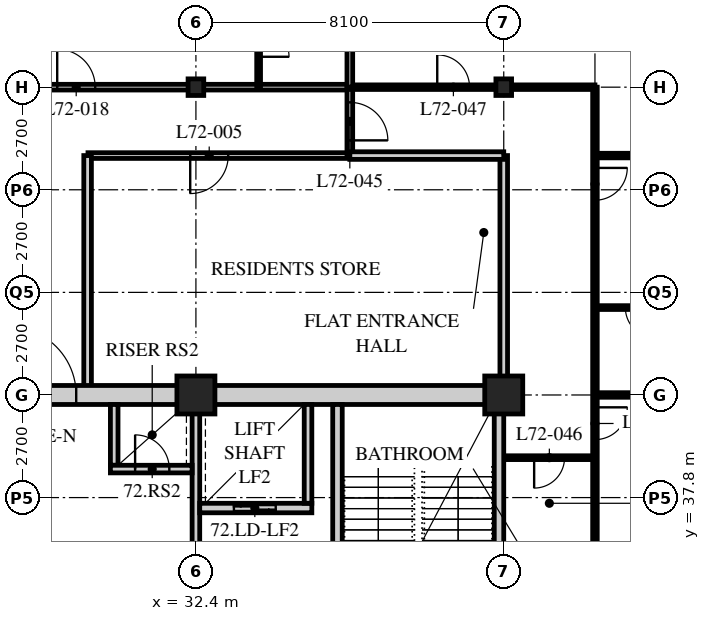
"""IFC4 building model, lengths in metres.
Left out: names, types, materials, properties, quantities, classifications, styles, units other than length and angle.
Written with IfcOpenShell. Run it as: python <this file> out.ifc"""

import sys

from ifc_helpers import new_model, si_unit, direction, frame, frame_2d, origin, origin_2d, place, context, subcontext, project, spatial, rectangle, hollow_rectangle, i_section, extrude, element, fill, save


model = new_model("IFC4")
c1 = context("Model", 3, precision=1e-05, world=origin(), true_north=direction((0.0, 1.0)))
c2 = subcontext(c1, "Body", "Model", "MODEL_VIEW")
j1 = project(units=[si_unit("LENGTHUNIT", "METRE"), si_unit("PLANEANGLEUNIT", "RADIAN")], contexts=[c1])
p1 = place(None, origin())
s1 = spatial("IfcSite", under=j1, at=p1, CompositionType="ELEMENT")
p2 = place(p1, origin())
s2 = spatial("IfcBuilding", under=s1, at=p2, CompositionType="ELEMENT")
p3 = place(p2, frame((0.0, 0.0, 281.4)))
s3 = spatial("IfcBuildingStorey", under=s2, at=p3, CompositionType="ELEMENT", Elevation=281.4)
p4 = place(p3, frame((32.4, 40.5, 0.0), z_axis=(0.0, 0.0, 1.0), x_axis=(1.0, 0.0, 0.0)))
e1 = element("IfcColumn", 1, at=p4, inside=s3, PredefinedType="COLUMN", context=c2, shape_type="SweptSolid", body=[
    extrude(hollow_rectangle(XDim=1.0, YDim=1.0, WallThickness=0.1, at=origin_2d()), origin(), (0.0, 0.0, 1.0), 3.9),
])
p5 = place(p3, frame((32.4, 48.6, 0.0), z_axis=(0.0, 0.0, 1.0), x_axis=(1.0, 0.0, 0.0)))
e2 = element("IfcColumn", 2, at=p5, inside=s3, PredefinedType="COLUMN", context=c2, shape_type="SweptSolid", body=[
    extrude(i_section(OverallWidth=0.412, OverallDepth=0.437, WebThickness=0.036, FlangeThickness=0.058, FilletRadius=0.015, at=origin_2d()), origin(), (0.0, 0.0, 1.0), 3.9),
])
p6 = place(p3, frame((40.5, 40.5, 0.0), z_axis=(0.0, 0.0, 1.0), x_axis=(1.0, 0.0, 0.0)))
e3 = element("IfcColumn", 3, at=p6, inside=s3, PredefinedType="COLUMN", context=c2, shape_type="SweptSolid", body=[
    extrude(hollow_rectangle(XDim=1.0, YDim=1.0, WallThickness=0.1, at=origin_2d()), origin(), (0.0, 0.0, 1.0), 3.9),
])
p7 = place(p3, frame((40.5, 48.6, 0.0), z_axis=(0.0, 0.0, 1.0), x_axis=(1.0, 0.0, 0.0)))
e4 = element("IfcColumn", 4, at=p7, inside=s3, PredefinedType="COLUMN", context=c2, shape_type="SweptSolid", body=[
    extrude(i_section(OverallWidth=0.412, OverallDepth=0.437, WebThickness=0.036, FlangeThickness=0.058, FilletRadius=0.015, at=origin_2d()), origin(), (0.0, 0.0, 1.0), 3.9),
])
p8 = place(p3, frame((12.15, 48.6, 0.0), z_axis=(0.0, 0.0, 1.0), x_axis=(1.0, 0.0, 0.0)))
e5 = element("IfcWall", 5, at=p8, inside=s3, PredefinedType="PARTITIONING", context=c2, shape_type="SweptSolid", body=[
    extrude(rectangle(XDim=24.3, YDim=0.15, at=frame_2d((12.15, 0.0))), origin(), (0.0, 0.0, 1.0), 3.078),
])
p9 = place(p8, frame((4.95, 0.0, 0.0)))
e6 = element("IfcOpeningElement", 6, at=p9, cuts=e5, PredefinedType="OPENING", context=c2, shape_type="SweptSolid", body=[
    extrude(rectangle(XDim=1.0, YDim=2.1, at=frame_2d((0.5, 1.05))), frame((0.0, 0.085, 0.0), z_axis=(0.0, -1.0, 0.0), x_axis=(1.0, 0.0, 0.0)), (0.0, 0.0, 1.0), 0.17),
])
p10 = place(p8, frame((16.6, 0.0, 0.0)))
e7 = element("IfcOpeningElement", 7, at=p10, cuts=e5, PredefinedType="OPENING", context=c2, shape_type="SweptSolid", body=[
    extrude(rectangle(XDim=1.0, YDim=2.1, at=frame_2d((0.5, 1.05))), frame((0.0, 0.085, 0.0), z_axis=(0.0, -1.0, 0.0), x_axis=(1.0, 0.0, 0.0)), (0.0, 0.0, 1.0), 0.17),
])
p11 = place(p8, frame((1.525, 0.0, 0.0)))
e8 = element("IfcOpeningElement", 8, at=p11, cuts=e5, PredefinedType="OPENING", context=c2, shape_type="SweptSolid", body=[
    extrude(rectangle(XDim=1.0, YDim=2.1, at=frame_2d((0.5, 1.05))), frame((0.0, 0.085, 0.0), z_axis=(0.0, -1.0, 0.0), x_axis=(1.0, 0.0, 0.0)), (0.0, 0.0, 1.0), 0.17),
])
p12 = place(p3, frame((29.56, 46.8, 0.0), z_axis=(0.0, 0.0, 1.0), x_axis=(1.0, 0.0, 0.0)))
e9 = element("IfcWall", 9, at=p12, inside=s3, PredefinedType="PARTITIONING", context=c2, shape_type="SweptSolid", body=[
    extrude(rectangle(XDim=6.89, YDim=0.15, at=frame_2d((3.445, 0.0))), origin(), (0.0, 0.0, 1.0), 3.69),
])
p13 = place(p12, frame((2.69, 0.0, 0.0)))
e10 = element("IfcOpeningElement", 10, at=p13, cuts=e9, PredefinedType="OPENING", context=c2, shape_type="SweptSolid", body=[
    extrude(rectangle(XDim=1.0, YDim=2.1, at=frame_2d((0.5, 1.05))), frame((0.0, 0.085, 0.0), z_axis=(0.0, -1.0, 0.0), x_axis=(1.0, 0.0, 0.0)), (0.0, 0.0, 1.0), 0.17),
])
p14 = place(p3, frame((29.55, 40.5, 0.0), z_axis=(0.0, 0.0, 1.0), x_axis=(0.0, 1.0, 0.0)))
e11 = element("IfcWall", 11, at=p14, inside=s3, PredefinedType="SOLIDWALL", context=c2, shape_type="SweptSolid", body=[
    extrude(rectangle(XDim=6.3, YDim=0.2, at=frame_2d((3.15, 0.0))), origin(), (0.0, 0.0, 1.0), 3.69),
])
p15 = place(p3, frame((36.45, 46.8, 0.0), z_axis=(0.0, 0.0, 1.0), x_axis=(0.0, 1.0, 0.0)))
e12 = element("IfcWall", 12, at=p15, inside=s3, PredefinedType="PARTITIONING", context=c2, shape_type="SweptSolid", body=[
    extrude(rectangle(XDim=1.8, YDim=0.15, at=frame_2d((0.9, 0.0))), origin(), (0.0, 0.0, 1.0), 3.69),
])
p16 = place(p15, frame((0.4, 0.0, 0.0)))
e13 = element("IfcOpeningElement", 13, at=p16, cuts=e12, PredefinedType="OPENING", context=c2, shape_type="SweptSolid", body=[
    extrude(rectangle(XDim=1.0, YDim=2.1, at=frame_2d((0.5, 1.05))), frame((0.0, 0.085, 0.0), z_axis=(0.0, -1.0, 0.0), x_axis=(1.0, 0.0, 0.0)), (0.0, 0.0, 1.0), 0.17),
])
p17 = place(p3, frame((40.5, 40.5, 0.0), z_axis=(0.0, 0.0, 1.0), x_axis=(0.0, 1.0, 0.0)))
e14 = element("IfcWall", 14, at=p17, inside=s3, PredefinedType="SOLIDWALL", context=c2, shape_type="SweptSolid", body=[
    extrude(rectangle(XDim=6.3, YDim=0.2, at=frame_2d((3.15, 0.0))), origin(), (0.0, 0.0, 1.0), 3.078),
])
p18 = place(p3, frame((34.05, 48.6, 0.0), z_axis=(0.0, 0.0, 1.0), x_axis=(0.0, 1.0, 0.0)))
e15 = element("IfcWall", 15, at=p18, inside=s3, PredefinedType="PARTITIONING", context=c2, shape_type="SweptSolid", body=[
    extrude(rectangle(XDim=2.4, YDim=0.1, at=frame_2d((1.2, 0.0))), origin(), (0.0, 0.0, 1.0), 3.69),
])
p19 = place(p18, frame((0.8, 0.0, 0.0)))
e16 = element("IfcOpeningElement", 16, at=p19, cuts=e15, PredefinedType="OPENING", context=c2, shape_type="SweptSolid", body=[
    extrude(rectangle(XDim=0.8, YDim=2.1, at=frame_2d((0.4, 1.05))), frame((0.0, 0.06, 0.0), z_axis=(0.0, -1.0, 0.0), x_axis=(1.0, 0.0, 0.0)), (0.0, 0.0, 1.0), 0.12),
])
p20 = place(p3, frame((40.5, 38.85, 0.0), z_axis=(0.0, 0.0, 1.0), x_axis=(1.0, 0.0, 0.0)))
e17 = element("IfcWall", 17, at=p20, inside=s3, PredefinedType="PARTITIONING", context=c2, shape_type="SweptSolid", body=[
    extrude(rectangle(XDim=2.4, YDim=0.1, at=frame_2d((1.2, 0.0))), origin(), (0.0, 0.0, 1.0), 3.69),
])
p21 = place(p20, frame((0.8, 0.0, 0.0)))
e18 = element("IfcOpeningElement", 18, at=p21, cuts=e17, PredefinedType="OPENING", context=c2, shape_type="SweptSolid", body=[
    extrude(rectangle(XDim=0.8, YDim=2.1, at=frame_2d((0.4, 1.05))), frame((0.0, 0.06, 0.0), z_axis=(0.0, -1.0, 0.0), x_axis=(1.0, 0.0, 0.0)), (0.0, 0.0, 1.0), 0.12),
])
p22 = place(p3, frame((42.9, 48.6, 0.0), z_axis=(0.0, 0.0, 1.0), x_axis=(0.0, -1.0, 0.0)))
e19 = element("IfcWall", 19, at=p22, inside=s3, PredefinedType="PARTITIONING", context=c2, shape_type="SweptSolid", body=[
    extrude(rectangle(XDim=12.15, YDim=0.12, at=frame_2d((6.075, 0.0))), origin(), (0.0, 0.0, 1.0), 3.69),
])
p23 = place(p22, frame((2.125, 0.0, 0.0)))
e20 = element("IfcOpeningElement", 20, at=p23, cuts=e19, PredefinedType="OPENING", context=c2, shape_type="SweptSolid", body=[
    extrude(rectangle(XDim=0.85, YDim=2.1, at=frame_2d((0.425, 1.05))), frame((0.0, 0.07, 0.0), z_axis=(0.0, -1.0, 0.0), x_axis=(1.0, 0.0, 0.0)), (0.0, 0.0, 1.0), 0.14),
])
p24 = place(p22, frame((8.425, 0.0, 0.0)))
e21 = element("IfcOpeningElement", 21, at=p24, cuts=e19, PredefinedType="OPENING", context=c2, shape_type="SweptSolid", body=[
    extrude(rectangle(XDim=0.85, YDim=2.1, at=frame_2d((0.425, 1.05))), frame((0.0, 0.07, 0.0), z_axis=(0.0, -1.0, 0.0), x_axis=(1.0, 0.0, 0.0)), (0.0, 0.0, 1.0), 0.14),
])
p25 = place(p3, frame((36.45, 48.6, 0.0), z_axis=(0.0, 0.0, 1.0), x_axis=(1.0, 0.0, 0.0)))
e22 = element("IfcWall", 22, at=p25, inside=s3, PredefinedType="PARTITIONING", context=c2, shape_type="SweptSolid", body=[
    extrude(rectangle(XDim=6.45, YDim=0.12, at=frame_2d((3.225, 0.0))), origin(), (0.0, 0.0, 1.0), 3.078),
])
p26 = place(p25, frame((2.3, 0.0, 0.0)))
e23 = element("IfcOpeningElement", 23, at=p26, cuts=e22, PredefinedType="OPENING", context=c2, shape_type="SweptSolid", body=[
    extrude(rectangle(XDim=0.85, YDim=2.1, at=frame_2d((0.425, 1.05))), frame((0.0, 0.07, 0.0), z_axis=(0.0, -1.0, 0.0), x_axis=(1.0, 0.0, 0.0)), (0.0, 0.0, 1.0), 0.14),
])
p27 = place(p3, frame((36.45, 46.8, 0.0), z_axis=(0.0, 0.0, 1.0), x_axis=(1.0, 0.0, 0.0)))
e24 = element("IfcWall", 24, at=p27, inside=s3, PredefinedType="SOLIDWALL", context=c2, shape_type="SweptSolid", body=[
    extrude(rectangle(XDim=4.05, YDim=0.2, at=frame_2d((2.025, 0.0))), origin(), (0.0, 0.0, 1.0), 3.69),
])
p28 = place(p3, frame((42.9, 46.8, 0.0), z_axis=(0.0, 0.0, 1.0), x_axis=(1.0, 0.0, 0.0)))
e25 = element("IfcWall", 25, at=p28, inside=s3, PredefinedType="PARTITIONING", context=c2, shape_type="SweptSolid", body=[
    extrude(rectangle(XDim=13.5, YDim=0.12, at=frame_2d((6.75, 0.0))), origin(), (0.0, 0.0, 1.0), 3.69),
])
p29 = place(p3, frame((36.45, 64.5, 0.0), z_axis=(0.0, 0.0, 1.0), x_axis=(0.0, -1.0, 0.0)))
e26 = element("IfcWall", 26, at=p29, inside=s3, PredefinedType="PARTITIONING", context=c2, shape_type="SweptSolid", body=[
    extrude(rectangle(XDim=15.9, YDim=0.15, at=frame_2d((7.95, 0.0))), origin(), (0.0, 0.0, 1.0), 3.69),
])
p30 = place(p3, frame((42.9, 42.8, 0.0), z_axis=(0.0, 0.0, 1.0), x_axis=(1.0, 0.0, 0.0)))
e27 = element("IfcWall", 27, at=p30, inside=s3, PredefinedType="PARTITIONING", context=c2, shape_type="SweptSolid", body=[
    extrude(rectangle(XDim=2.4, YDim=0.1, at=frame_2d((1.2, 0.0))), origin(), (0.0, 0.0, 1.0), 3.69),
])
p31 = place(p30, frame((0.8, 0.0, 0.0)))
e28 = element("IfcOpeningElement", 28, at=p31, cuts=e27, PredefinedType="OPENING", context=c2, shape_type="SweptSolid", body=[
    extrude(rectangle(XDim=0.8, YDim=2.1, at=frame_2d((0.4, 1.05))), frame((0.0, 0.06, 0.0), z_axis=(0.0, -1.0, 0.0), x_axis=(1.0, 0.0, 0.0)), (0.0, 0.0, 1.0), 0.12),
])
p32 = place(p3, frame((42.9, 40.5, 0.0), z_axis=(0.0, 0.0, 1.0), x_axis=(1.0, 0.0, 0.0)))
e29 = element("IfcWall", 29, at=p32, inside=s3, PredefinedType="PARTITIONING", context=c2, shape_type="SweptSolid", body=[
    extrude(rectangle(XDim=13.5, YDim=0.12, at=frame_2d((6.75, 0.0))), origin(), (0.0, 0.0, 1.0), 3.078),
])
p33 = place(p3, frame((15.95, 40.5, 0.0), z_axis=(0.0, 0.0, 1.0), x_axis=(1.0, 0.0, 0.0)))
e30 = element("IfcWall", 30, at=p33, inside=s3, PredefinedType="SOLIDWALL", context=c2, shape_type="SweptSolid", body=[
    extrude(rectangle(XDim=24.55, YDim=0.5, at=frame_2d((12.275, 0.0))), origin(), (0.0, 0.0, 1.0), 3.04),
])
p34 = place(p33, frame((11.5, 0.0, 0.0)))
e31 = element("IfcOpeningElement", 31, at=p34, cuts=e30, PredefinedType="OPENING", context=c2, shape_type="SweptSolid", body=[
    extrude(rectangle(XDim=1.8, YDim=2.4, at=frame_2d((0.9, 1.2))), frame((0.0, 0.26, 0.0), z_axis=(0.0, -1.0, 0.0), x_axis=(1.0, 0.0, 0.0)), (0.0, 0.0, 1.0), 0.52),
])
p35 = place(p3, frame((40.375, 24.55, 0.0), z_axis=(0.0, 0.0, 1.0), x_axis=(0.0, 1.0, 0.0)))
e32 = element("IfcWall", 32, at=p35, inside=s3, PredefinedType="SOLIDWALL", context=c2, shape_type="SweptSolid", body=[
    extrude(rectangle(XDim=15.7, YDim=0.25, at=frame_2d((7.85, 0.0))), origin(), (0.0, 0.0, 1.0), 3.078),
])
p36 = place(p3, frame((32.4, 32.5, 0.0), z_axis=(0.0, 0.0, 1.0), x_axis=(0.0, 1.0, 0.0)))
e33 = element("IfcWall", 33, at=p36, inside=s3, PredefinedType="SOLIDWALL", context=c2, shape_type="SweptSolid", body=[
    extrude(rectangle(XDim=7.75, YDim=0.2, at=frame_2d((3.875, 0.0))), origin(), (0.0, 0.0, 1.0), 3.078),
])
p37 = place(p36, frame((1.9, 0.0, 0.0)))
e34 = element("IfcOpeningElement", 34, at=p37, cuts=e33, PredefinedType="OPENING", context=c2, shape_type="SweptSolid", body=[
    extrude(rectangle(XDim=1.2, YDim=2.1, at=frame_2d((0.6, 1.05))), frame((0.0, 0.11, 0.0), z_axis=(0.0, -1.0, 0.0), x_axis=(1.0, 0.0, 0.0)), (0.0, 0.0, 1.0), 0.22),
])
p38 = place(p3, frame((36.125, 32.5, 0.0), z_axis=(0.0, 0.0, 1.0), x_axis=(0.0, 1.0, 0.0)))
e35 = element("IfcWall", 35, at=p38, inside=s3, PredefinedType="SOLIDWALL", context=c2, shape_type="SweptSolid", body=[
    extrude(rectangle(XDim=7.75, YDim=0.25, at=frame_2d((3.875, 0.0))), origin(), (0.0, 0.0, 1.0), 3.69),
])
p39 = place(p38, frame((0.45, 0.0, 0.0)))
e36 = element("IfcOpeningElement", 36, at=p39, cuts=e35, PredefinedType="OPENING", context=c2, shape_type="SweptSolid", body=[
    extrude(rectangle(XDim=1.2, YDim=2.1, at=frame_2d((0.6, 1.05))), frame((0.0, 0.135, 0.0), z_axis=(0.0, -1.0, 0.0), x_axis=(1.0, 0.0, 0.0)), (0.0, 0.0, 1.0), 0.27),
])
p40 = place(p3, frame((32.5, 37.525, 0.0), z_axis=(0.0, 0.0, 1.0), x_axis=(1.0, 0.0, 0.0)))
e37 = element("IfcWall", 37, at=p40, inside=s3, PredefinedType="SOLIDWALL", context=c2, shape_type="SweptSolid", body=[
    extrude(rectangle(XDim=2.95, YDim=0.25, at=frame_2d((1.475, 0.0))), origin(), (0.0, 0.0, 1.0), 3.69),
])
p41 = place(p40, frame((0.9, 0.0, 0.0)))
e38 = element("IfcOpeningElement", 38, at=p41, cuts=e37, PredefinedType="OPENING", context=c2, shape_type="SweptSolid", body=[
    extrude(rectangle(XDim=1.1, YDim=2.4, at=frame_2d((0.55, 1.2))), frame((0.0, 0.135, 0.0), z_axis=(0.0, -1.0, 0.0), x_axis=(1.0, 0.0, 0.0)), (0.0, 0.0, 1.0), 0.27),
])
p42 = place(p3, frame((35.35, 37.65, 0.0), z_axis=(0.0, 0.0, 1.0), x_axis=(0.0, 1.0, 0.0)))
e39 = element("IfcWall", 39, at=p42, inside=s3, PredefinedType="SOLIDWALL", context=c2, shape_type="SweptSolid", body=[
    extrude(rectangle(XDim=2.6, YDim=0.2, at=frame_2d((1.3, 0.0))), origin(), (0.0, 0.0, 1.0), 3.69),
])
p43 = place(p3, frame((30.25, 38.65, 0.0), z_axis=(0.0, 0.0, 1.0), x_axis=(0.0, 1.0, 0.0)))
e40 = element("IfcWall", 40, at=p43, inside=s3, PredefinedType="SOLIDWALL", context=c2, shape_type="SweptSolid", body=[
    extrude(rectangle(XDim=1.6, YDim=0.2, at=frame_2d((0.8, 0.0))), origin(), (0.0, 0.0, 1.0), 3.69),
])
p44 = place(p3, frame((30.15, 38.55, 0.0), z_axis=(0.0, 0.0, 1.0), x_axis=(1.0, 0.0, 0.0)))
e41 = element("IfcWall", 41, at=p44, inside=s3, PredefinedType="SOLIDWALL", context=c2, shape_type="SweptSolid", body=[
    extrude(rectangle(XDim=2.15, YDim=0.2, at=frame_2d((1.075, 0.0))), origin(), (0.0, 0.0, 1.0), 3.69),
])
p45 = place(p44, frame((0.65, 0.0, 0.0)))
e42 = element("IfcOpeningElement", 42, at=p45, cuts=e41, PredefinedType="OPENING", context=c2, shape_type="SweptSolid", body=[
    extrude(rectangle(XDim=0.9, YDim=2.1, at=frame_2d((0.45, 1.05))), frame((0.0, 0.11, 0.0), z_axis=(0.0, -1.0, 0.0), x_axis=(1.0, 0.0, 0.0)), (0.0, 0.0, 1.0), 0.22),
])
p46 = place(p13, origin())
e43 = element("IfcDoor", 43, at=p46, inside=s3, OperationType="SINGLE_SWING_RIGHT", PredefinedType="DOOR", context=c2, shape_type="SweptSolid", body=[
    extrude(rectangle(XDim=1.0, YDim=2.1, at=frame_2d((0.5, 1.05))), frame((0.0, 0.025, 0.0), z_axis=(0.0, -1.0, 0.0), x_axis=(1.0, 0.0, 0.0)), (0.0, 0.0, 1.0), 0.05),
])
fill(e10, e43)
p47 = place(p19, origin())
e44 = element("IfcDoor", 44, at=p47, inside=s3, OperationType="SINGLE_SWING_RIGHT", PredefinedType="DOOR", context=c2, shape_type="SweptSolid", body=[
    extrude(rectangle(XDim=0.8, YDim=2.1, at=frame_2d((0.4, 1.05))), frame((0.0, 0.025, 0.0), z_axis=(0.0, -1.0, 0.0), x_axis=(1.0, 0.0, 0.0)), (0.0, 0.0, 1.0), 0.05),
])
fill(e16, e44)
p48 = place(p10, origin())
e45 = element("IfcDoor", 45, at=p48, inside=s3, OperationType="SINGLE_SWING_LEFT", PredefinedType="DOOR", context=c2, shape_type="SweptSolid", body=[
    extrude(rectangle(XDim=1.0, YDim=2.1, at=frame_2d((0.5, 1.05))), frame((0.0, 0.025, 0.0), z_axis=(0.0, -1.0, 0.0), x_axis=(1.0, 0.0, 0.0)), (0.0, 0.0, 1.0), 0.05),
])
fill(e7, e45)
p49 = place(p16, origin())
e46 = element("IfcDoor", 46, at=p49, inside=s3, OperationType="SINGLE_SWING_RIGHT", PredefinedType="DOOR", context=c2, shape_type="SweptSolid", body=[
    extrude(rectangle(XDim=1.0, YDim=2.1, at=frame_2d((0.5, 1.05))), frame((0.0, 0.025, 0.0), z_axis=(0.0, -1.0, 0.0), x_axis=(1.0, 0.0, 0.0)), (0.0, 0.0, 1.0), 0.05),
])
fill(e13, e46)
p50 = place(p21, origin())
e47 = element("IfcDoor", 47, at=p50, inside=s3, OperationType="SINGLE_SWING_RIGHT", PredefinedType="DOOR", context=c2, shape_type="SweptSolid", body=[
    extrude(rectangle(XDim=0.8, YDim=2.1, at=frame_2d((0.4, 1.05))), frame((0.0, 0.025, 0.0), z_axis=(0.0, -1.0, 0.0), x_axis=(1.0, 0.0, 0.0)), (0.0, 0.0, 1.0), 0.05),
])
fill(e18, e47)
p51 = place(p26, origin())
e48 = element("IfcDoor", 48, at=p51, inside=s3, OperationType="SINGLE_SWING_LEFT", PredefinedType="DOOR", context=c2, shape_type="SweptSolid", body=[
    extrude(rectangle(XDim=0.85, YDim=2.1, at=frame_2d((0.425, 1.05))), frame((0.0, 0.025, 0.0), z_axis=(0.0, -1.0, 0.0), x_axis=(1.0, 0.0, 0.0)), (0.0, 0.0, 1.0), 0.05),
])
fill(e23, e48)
p52 = place(p31, origin())
e49 = element("IfcDoor", 49, at=p52, inside=s3, OperationType="SINGLE_SWING_LEFT", PredefinedType="DOOR", context=c2, shape_type="SweptSolid", body=[
    extrude(rectangle(XDim=0.8, YDim=2.1, at=frame_2d((0.4, 1.05))), frame((0.0, 0.025, 0.0), z_axis=(0.0, -1.0, 0.0), x_axis=(1.0, 0.0, 0.0)), (0.0, 0.0, 1.0), 0.05),
])
fill(e28, e49)
p53 = place(p23, origin())
e50 = element("IfcDoor", 50, at=p53, inside=s3, OperationType="SINGLE_SWING_LEFT", PredefinedType="DOOR", context=c2, shape_type="SweptSolid", body=[
    extrude(rectangle(XDim=0.85, YDim=2.1, at=frame_2d((0.425, 1.05))), frame((0.0, 0.025, 0.0), z_axis=(0.0, -1.0, 0.0), x_axis=(1.0, 0.0, 0.0)), (0.0, 0.0, 1.0), 0.05),
])
fill(e20, e50)
p54 = place(p24, origin())
e51 = element("IfcDoor", 51, at=p54, inside=s3, OperationType="SINGLE_SWING_LEFT", PredefinedType="DOOR", context=c2, shape_type="SweptSolid", body=[
    extrude(rectangle(XDim=0.85, YDim=2.1, at=frame_2d((0.425, 1.05))), frame((0.0, 0.025, 0.0), z_axis=(0.0, -1.0, 0.0), x_axis=(1.0, 0.0, 0.0)), (0.0, 0.0, 1.0), 0.05),
])
fill(e21, e51)
p55 = place(p45, origin())
e52 = element("IfcDoor", 52, at=p55, inside=s3, OperationType="SINGLE_SWING_LEFT", PredefinedType="DOOR", context=c2, shape_type="SweptSolid", body=[
    extrude(rectangle(XDim=0.9, YDim=2.1, at=frame_2d((0.45, 1.05))), frame((0.0, 0.025, 0.0), z_axis=(0.0, -1.0, 0.0), x_axis=(1.0, 0.0, 0.0)), (0.0, 0.0, 1.0), 0.05),
])
fill(e42, e52)
p56 = place(p41, origin())
e53 = element("IfcDoor", 53, at=p56, inside=s3, OperationType="DOUBLE_DOOR_SLIDING", PredefinedType="DOOR", context=c2, shape_type="SweptSolid", body=[
    extrude(rectangle(XDim=1.1, YDim=2.4, at=frame_2d((0.55, 1.2))), frame((0.0, 0.025, 0.0), z_axis=(0.0, -1.0, 0.0), x_axis=(1.0, 0.0, 0.0)), (0.0, 0.0, 1.0), 0.05),
])
fill(e38, e53)
p57 = place(p34, origin())
e54 = element("IfcDoor", 54, at=p57, inside=s3, OperationType="DOUBLE_DOOR_SINGLE_SWING", PredefinedType="DOOR", context=c2, shape_type="SweptSolid", body=[
    extrude(rectangle(XDim=1.8, YDim=2.4, at=frame_2d((0.9, 1.2))), frame((0.0, 0.025, 0.0), z_axis=(0.0, -1.0, 0.0), x_axis=(1.0, 0.0, 0.0)), (0.0, 0.0, 1.0), 0.05),
])
fill(e31, e54)
save(model, sys.argv[1])
